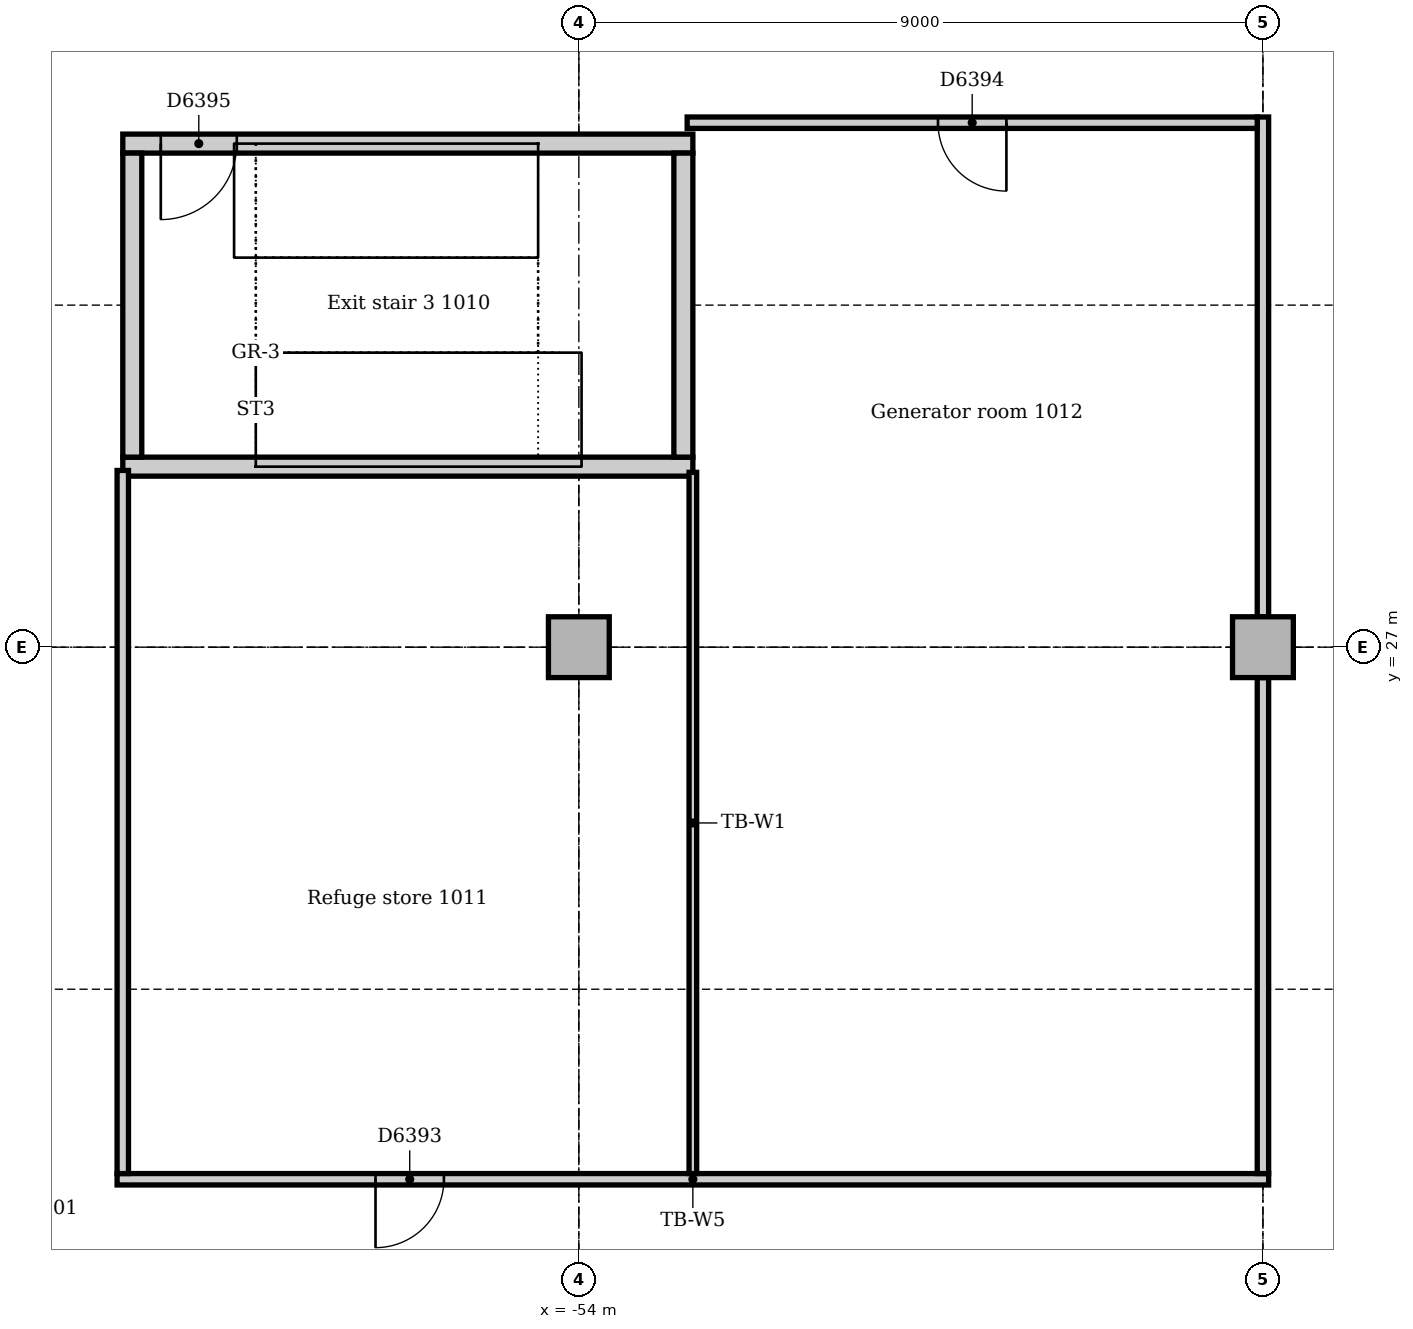
"""IFC4 building model, lengths in metres.
Left out: names, types, materials, properties, quantities, classifications, styles, units other than length and angle.
Written with IfcOpenShell. Run it as: python <this file> out.ifc"""

import sys

from ifc_helpers import new_model, si_unit, direction, frame, frame_2d, origin, origin_2d, place, context, subcontext, project, spatial, rectangle, extrude, element, fill, save


model = new_model("IFC4")
c1 = context("Model", 3, precision=1e-05, world=origin(), true_north=direction((0.0, 1.0)))
c2 = subcontext(c1, "Body", "Model", "MODEL_VIEW")
j1 = project(units=[si_unit("LENGTHUNIT", "METRE"), si_unit("PLANEANGLEUNIT", "RADIAN")], contexts=[c1])
p1 = place(None, origin())
s1 = spatial("IfcSite", under=j1, at=p1, CompositionType="ELEMENT")
p2 = place(p1, origin())
s2 = spatial("IfcBuilding", under=s1, at=p2, CompositionType="ELEMENT")
p3 = place(p2, frame((0.0, 0.0, 46.0)))
s3 = spatial("IfcBuildingStorey", under=s2, at=p3, CompositionType="ELEMENT", Elevation=46.0)
p4 = place(p3, frame((-60.0, 29.375, 0.0), z_axis=(0.0, 0.0, 1.0), x_axis=(1.0, 0.0, 0.0)))
e1 = element("IfcWall", 1, at=p4, inside=s3, PredefinedType="SOLIDWALL", context=c2, shape_type="SweptSolid", body=[
    extrude(rectangle(XDim=7.5, YDim=0.25, at=frame_2d((3.75, 0.0))), origin(), (0.0, 0.0, 1.0), 5.0),
])
p5 = place(p3, frame((-52.5, 33.625, 0.0), z_axis=(0.0, 0.0, 1.0), x_axis=(-1.0, 0.0, 0.0)))
e2 = element("IfcWall", 2, at=p5, inside=s3, PredefinedType="SOLIDWALL", context=c2, shape_type="SweptSolid", body=[
    extrude(rectangle(XDim=7.5, YDim=0.25, at=frame_2d((3.75, 0.0))), origin(), (0.0, 0.0, 1.0), 5.0),
])
p6 = place(p5, frame((6.0, 0.0, 0.0)))
e3 = element("IfcOpeningElement", 3, at=p6, cuts=e2, PredefinedType="OPENING", context=c2, shape_type="SweptSolid", body=[
    extrude(rectangle(XDim=1.0, YDim=2.1, at=frame_2d((0.5, 1.05))), frame((0.0, 0.135, 0.0), z_axis=(0.0, -1.0, 0.0), x_axis=(1.0, 0.0, 0.0)), (0.0, 0.0, 1.0), 0.27),
])
for number, where, z_axis, x_axis in (
    (4, (-52.625, 29.5, 0.0), (0.0, 0.0, 1.0), (0.0, 1.0, 0.0)),
    (5, (-59.875, 33.5, 0.0), (0.0, 0.0, 1.0), (0.0, -1.0, 0.0)),
):
    element("IfcWall", number, at=place(p3, frame(where, z_axis=z_axis, x_axis=x_axis)), inside=s3, PredefinedType="SOLIDWALL", context=c2, shape_type="SweptSolid", body=[
        extrude(rectangle(XDim=4.0, YDim=0.25, at=frame_2d((2.0, 0.0))), origin(), (0.0, 0.0, 1.0), 5.0),
    ])
for number, where, z_axis, x_axis in (
    (6, (-54.0, 27.0, 0.0), (0.0, 0.0, 1.0), (1.0, 0.0, 0.0)),
    (7, (-45.0, 27.0, 0.0), (0.0, 0.0, 1.0), (1.0, 0.0, 0.0)),
):
    element("IfcColumn", number, at=place(p3, frame(where, z_axis=z_axis, x_axis=x_axis)), inside=s3, PredefinedType="COLUMN", context=c2, shape_type="SweptSolid", body=[
        extrude(rectangle(XDim=0.8, YDim=0.8, at=origin_2d()), origin(), (0.0, 0.0, 1.0), 4.85),
    ])
p7 = place(p3, frame((-60.075, 20.0, 0.0), z_axis=(0.0, 0.0, 1.0), x_axis=(1.0, 0.0, 0.0)))
e8 = element("IfcWall", 8, at=p7, inside=s3, PredefinedType="PARTITIONING", context=c2, shape_type="SweptSolid", body=[
    extrude(rectangle(XDim=15.15, YDim=0.15, at=frame_2d((7.575, 0.0))), origin(), (0.0, 0.0, 1.0), 4.85),
])
p8 = place(p7, frame((3.4, 0.0, 0.0)))
e9 = element("IfcOpeningElement", 9, at=p8, cuts=e8, PredefinedType="OPENING", context=c2, shape_type="SweptSolid", body=[
    extrude(rectangle(XDim=0.9, YDim=2.1, at=frame_2d((0.45, 1.05))), frame((0.0, 0.085, 0.0), z_axis=(0.0, -1.0, 0.0), x_axis=(1.0, 0.0, 0.0)), (0.0, 0.0, 1.0), 0.17),
])
p9 = place(p3, frame((-45.0, 20.075, 0.0), z_axis=(0.0, 0.0, 1.0), x_axis=(0.0, 1.0, 0.0)))
e10 = element("IfcWall", 10, at=p9, inside=s3, PredefinedType="PARTITIONING", context=c2, shape_type="SweptSolid", body=[
    extrude(rectangle(XDim=6.525, YDim=0.15, at=frame_2d((3.263, 0.0))), origin(), (0.0, 0.0, 1.0), 4.256),
])
p10 = place(p3, frame((-45.0, 27.4, 0.0), z_axis=(0.0, 0.0, 1.0), x_axis=(0.0, 1.0, 0.0)))
e11 = element("IfcWall", 11, at=p10, inside=s3, PredefinedType="PARTITIONING", context=c2, shape_type="SweptSolid", body=[
    extrude(rectangle(XDim=6.575, YDim=0.15, at=frame_2d((3.288, 0.0))), origin(), (0.0, 0.0, 1.0), 4.256),
])
p11 = place(p3, frame((-60.0, 20.075, 0.0), z_axis=(0.0, 0.0, 1.0), x_axis=(0.0, 1.0, 0.0)))
e12 = element("IfcWall", 12, at=p11, inside=s3, PredefinedType="PARTITIONING", context=c2, shape_type="SweptSolid", body=[
    extrude(rectangle(XDim=9.25, YDim=0.15, at=frame_2d((4.625, 0.0))), origin(), (0.0, 0.0, 1.0), 4.85),
])
p12 = place(p3, frame((-52.575, 33.9, 0.0), z_axis=(0.0, 0.0, 1.0), x_axis=(1.0, 0.0, 0.0)))
e13 = element("IfcWall", 13, at=p12, inside=s3, PredefinedType="PARTITIONING", context=c2, shape_type="SweptSolid", body=[
    extrude(rectangle(XDim=7.5, YDim=0.15, at=frame_2d((3.75, 0.0))), origin(), (0.0, 0.0, 1.0), 4.85),
])
p13 = place(p12, frame((3.3, 0.0, 0.0)))
e14 = element("IfcOpeningElement", 14, at=p13, cuts=e13, PredefinedType="OPENING", context=c2, shape_type="SweptSolid", body=[
    extrude(rectangle(XDim=0.9, YDim=2.1, at=frame_2d((0.45, 1.05))), frame((0.0, 0.085, 0.0), z_axis=(0.0, -1.0, 0.0), x_axis=(1.0, 0.0, 0.0)), (0.0, 0.0, 1.0), 0.17),
])
p14 = place(p3, frame((-52.5, 20.075, 0.0), z_axis=(0.0, 0.0, 1.0), x_axis=(0.0, 1.0, 0.0)))
e15 = element("IfcWall", 15, at=p14, inside=s3, PredefinedType="PARTITIONING", context=c2, shape_type="SweptSolid", body=[
    extrude(rectangle(XDim=9.225, YDim=0.1, at=frame_2d((4.612, 0.0))), origin(), (0.0, 0.0, 1.0), 4.85),
])
p15 = place(p8, frame((0.9, 0.0, 0.0), z_axis=(0.0, 0.0, 1.0), x_axis=(-1.0, 0.0, 0.0)))
e16 = element("IfcDoor", 16, at=p15, inside=s3, OperationType="SINGLE_SWING_RIGHT", PredefinedType="DOOR", context=c2, shape_type="SweptSolid", body=[
    extrude(rectangle(XDim=0.9, YDim=2.1, at=frame_2d((0.45, 1.05))), frame((0.0, 0.025, 0.0), z_axis=(0.0, -1.0, 0.0), x_axis=(1.0, 0.0, 0.0)), (0.0, 0.0, 1.0), 0.05),
])
fill(e9, e16)
p16 = place(p13, frame((0.9, 0.0, 0.0), z_axis=(0.0, 0.0, 1.0), x_axis=(-1.0, 0.0, 0.0)))
e17 = element("IfcDoor", 17, at=p16, inside=s3, OperationType="SINGLE_SWING_LEFT", PredefinedType="DOOR", context=c2, shape_type="SweptSolid", body=[
    extrude(rectangle(XDim=0.9, YDim=2.1, at=frame_2d((0.45, 1.05))), frame((0.0, 0.025, 0.0), z_axis=(0.0, -1.0, 0.0), x_axis=(1.0, 0.0, 0.0)), (0.0, 0.0, 1.0), 0.05),
])
fill(e14, e17)
p17 = place(p6, origin())
e18 = element("IfcDoor", 18, at=p17, inside=s3, OperationType="SINGLE_SWING_RIGHT", PredefinedType="DOOR", context=c2, shape_type="SweptSolid", body=[
    extrude(rectangle(XDim=1.0, YDim=2.1, at=frame_2d((0.5, 1.05))), frame((0.0, 0.025, 0.0), z_axis=(0.0, -1.0, 0.0), x_axis=(1.0, 0.0, 0.0)), (0.0, 0.0, 1.0), 0.05),
])
fill(e3, e18)
save(model, sys.argv[1])
